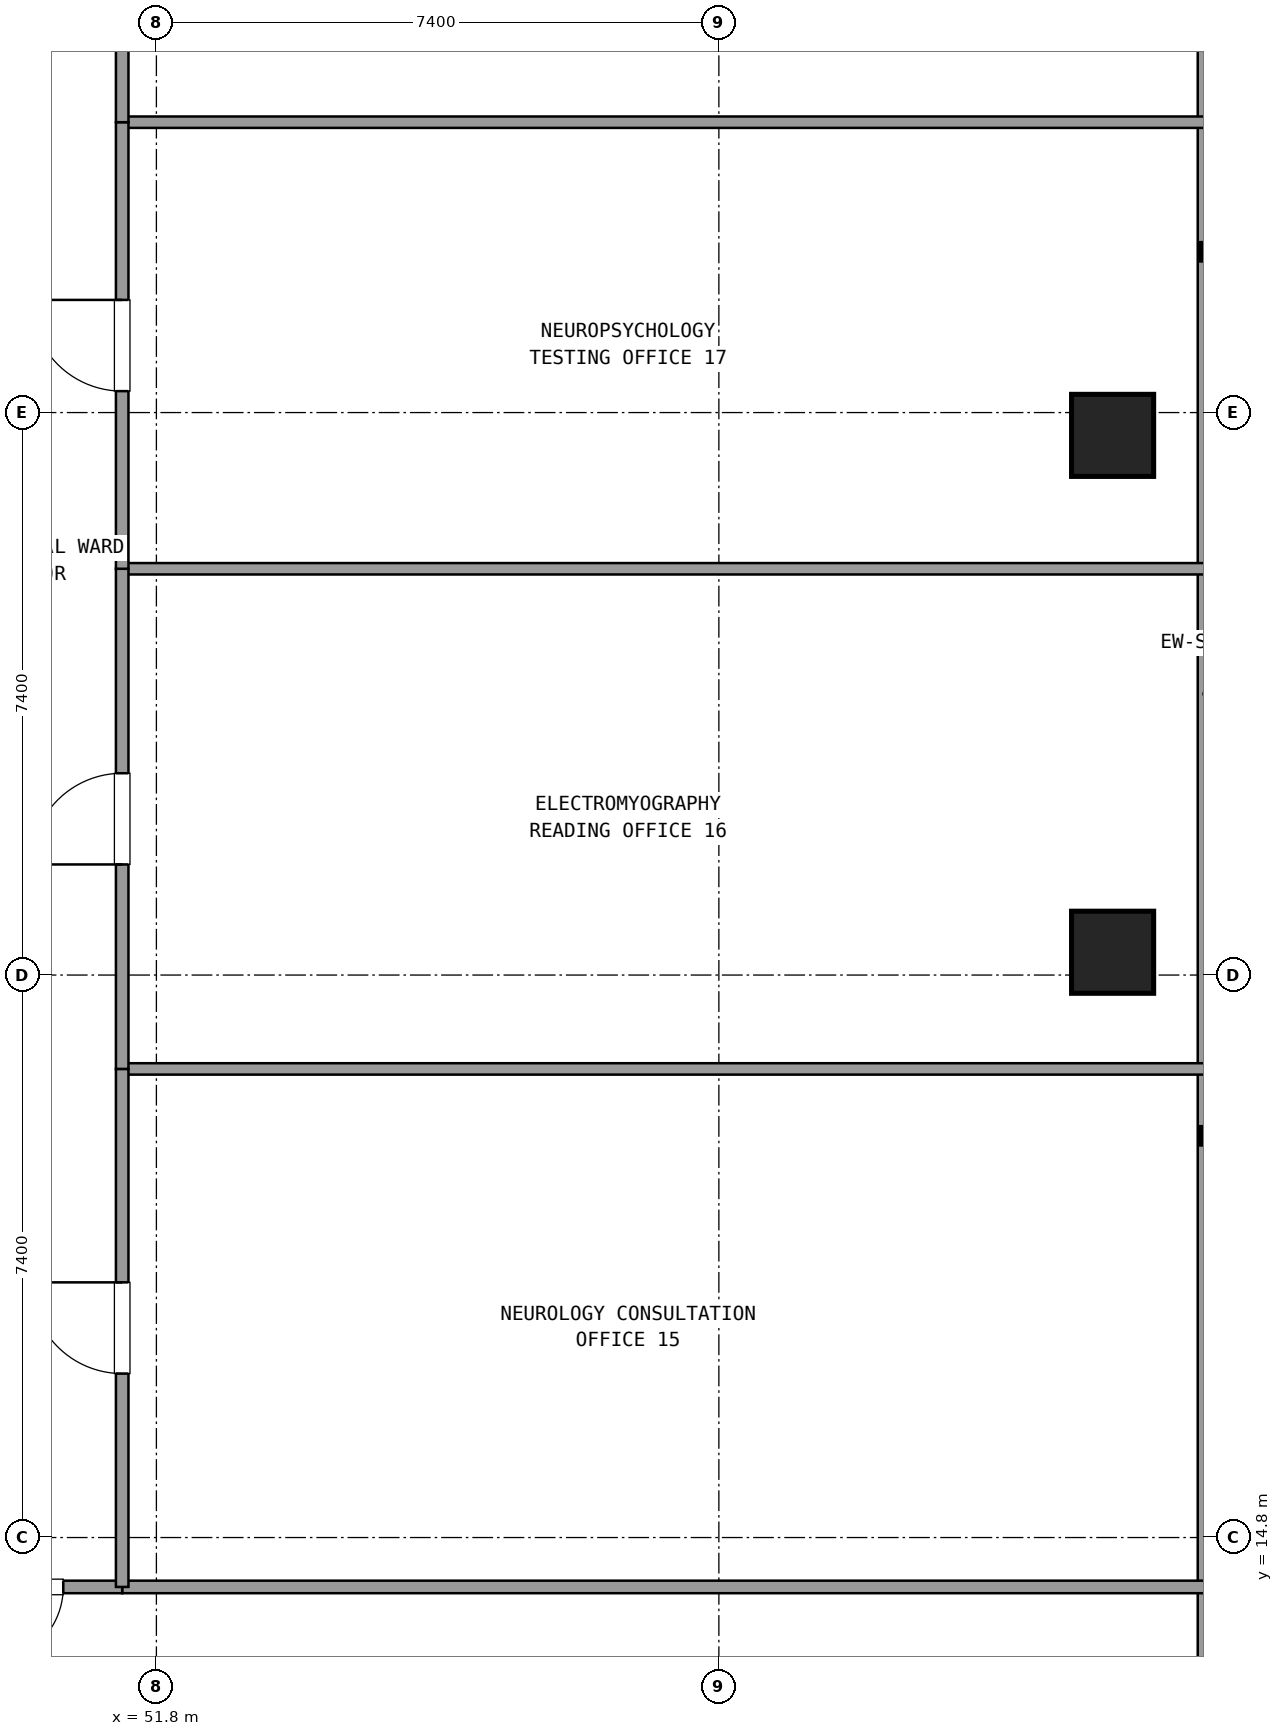
"""IFC4 building model, lengths in metres.
Left out: names, types, materials, properties, quantities, classifications, styles, units other than length and angle.
Written with IfcOpenShell. Run it as: python <this file> out.ifc"""

import sys

from ifc_helpers import new_model, si_unit, direction, frame, frame_2d, origin, origin_2d, place, context, subcontext, project, spatial, rectangle, extrude, element, fill, save


model = new_model("IFC4")
c1 = context("Model", 3, precision=1e-05, world=origin(), true_north=direction((0.0, 1.0)))
c2 = subcontext(c1, "Body", "Model", "MODEL_VIEW")
j1 = project(units=[si_unit("LENGTHUNIT", "METRE"), si_unit("PLANEANGLEUNIT", "RADIAN")], contexts=[c1])
p1 = place(None, origin())
s1 = spatial("IfcSite", under=j1, at=p1, CompositionType="ELEMENT")
p2 = place(p1, origin())
s2 = spatial("IfcBuilding", under=s1, at=p2, CompositionType="ELEMENT")
p3 = place(p2, frame((0.0, 0.0, 67.14)))
s3 = spatial("IfcBuildingStorey", under=s2, at=p3, CompositionType="ELEMENT", Elevation=67.14)
for number, where, z_axis, x_axis in (
    (1, (64.38, 22.5, 0.0), (0.0, 0.0, 1.0), (1.0, 0.0, 0.0)),
    (2, (64.38, 29.3, 0.0), (0.0, 0.0, 1.0), (1.0, 0.0, 0.0)),
):
    element("IfcColumn", number, at=place(p3, frame(where, z_axis=z_axis, x_axis=x_axis)), inside=s3, PredefinedType="COLUMN", context=c2, shape_type="SweptSolid", body=[
        extrude(rectangle(XDim=1.08, YDim=1.08, at=origin_2d()), origin(), (0.0, 0.0, 1.0), 3.6),
    ])
p4 = place(p3, frame((65.62, 8.455, 0.0), z_axis=(0.0, 0.0, 1.0), x_axis=(0.0, 1.0, 0.0)))
e3 = element("IfcWall", 3, at=p4, inside=s3, PredefinedType="SOLIDWALL", context=c2, shape_type="SweptSolid", body=[
    extrude(rectangle(XDim=34.89, YDim=0.24, at=frame_2d((17.445, 0.0))), origin(), (0.0, 0.0, 1.0), 0.85),
])
p5 = place(p3, frame((51.35, 14.15, 0.0), z_axis=(0.0, 0.0, 1.0), x_axis=(1.0, 0.0, 0.0)))
e4 = element("IfcWall", 4, at=p5, inside=s3, PredefinedType="PARTITIONING", context=c2, shape_type="SweptSolid", body=[
    extrude(rectangle(XDim=14.25, YDim=0.165, at=frame_2d((7.125, 0.0))), origin(), (0.0, 0.0, 1.0), 2.59),
])
p6 = place(p3, frame((48.8, 14.15, 0.0), z_axis=(0.0, 0.0, 1.0), x_axis=(1.0, 0.0, 0.0)))
e5 = element("IfcWall", 5, at=p6, inside=s3, PredefinedType="PARTITIONING", context=c2, shape_type="SweptSolid", body=[
    extrude(rectangle(XDim=2.55, YDim=0.165, at=frame_2d((1.275, 0.0))), origin(), (0.0, 0.0, 1.0), 2.59),
])
p7 = place(p6, frame((0.775, 0.0, 0.0)))
e6 = element("IfcOpeningElement", 6, at=p7, cuts=e5, PredefinedType="OPENING", context=c2, shape_type="SweptSolid", body=[
    extrude(rectangle(XDim=1.0, YDim=2.15, at=frame_2d((0.5, 1.075))), frame((0.0, 0.093, 0.0), z_axis=(0.0, -1.0, 0.0), x_axis=(1.0, 0.0, 0.0)), (0.0, 0.0, 1.0), 0.185),
])
p8 = place(p3, frame((51.35, 20.965, 0.0), z_axis=(0.0, 0.0, 1.0), x_axis=(1.0, 0.0, 0.0)))
e7 = element("IfcWall", 7, at=p8, inside=s3, PredefinedType="PARTITIONING", context=c2, shape_type="SweptSolid", body=[
    extrude(rectangle(XDim=14.25, YDim=0.15, at=frame_2d((7.125, 0.0))), origin(), (0.0, 0.0, 1.0), 2.59),
])
p9 = place(p3, frame((51.35, 14.15, 0.0), z_axis=(0.0, 0.0, 1.0), x_axis=(0.0, 1.0, 0.0)))
e8 = element("IfcWall", 8, at=p9, inside=s3, PredefinedType="PARTITIONING", context=c2, shape_type="SweptSolid", body=[
    extrude(rectangle(XDim=6.815, YDim=0.165, at=frame_2d((3.408, 0.0))), origin(), (0.0, 0.0, 1.0), 2.59),
])
p10 = place(p9, frame((2.807, 0.0, 0.0)))
e9 = element("IfcOpeningElement", 9, at=p10, cuts=e8, PredefinedType="OPENING", context=c2, shape_type="SweptSolid", body=[
    extrude(rectangle(XDim=1.2, YDim=2.15, at=frame_2d((0.6, 1.075))), frame((0.0, 0.093, 0.0), z_axis=(0.0, -1.0, 0.0), x_axis=(1.0, 0.0, 0.0)), (0.0, 0.0, 1.0), 0.185),
])
p11 = place(p3, frame((51.35, 27.545, 0.0), z_axis=(0.0, 0.0, 1.0), x_axis=(1.0, 0.0, 0.0)))
e10 = element("IfcWall", 10, at=p11, inside=s3, PredefinedType="PARTITIONING", context=c2, shape_type="SweptSolid", body=[
    extrude(rectangle(XDim=14.25, YDim=0.15, at=frame_2d((7.125, 0.0))), origin(), (0.0, 0.0, 1.0), 2.59),
])
p12 = place(p3, frame((51.35, 20.965, 0.0), z_axis=(0.0, 0.0, 1.0), x_axis=(0.0, 1.0, 0.0)))
e11 = element("IfcWall", 11, at=p12, inside=s3, PredefinedType="PARTITIONING", context=c2, shape_type="SweptSolid", body=[
    extrude(rectangle(XDim=6.58, YDim=0.165, at=frame_2d((3.29, 0.0))), origin(), (0.0, 0.0, 1.0), 2.59),
])
p13 = place(p12, frame((2.69, 0.0, 0.0)))
e12 = element("IfcOpeningElement", 12, at=p13, cuts=e11, PredefinedType="OPENING", context=c2, shape_type="SweptSolid", body=[
    extrude(rectangle(XDim=1.2, YDim=2.15, at=frame_2d((0.6, 1.075))), frame((0.0, 0.093, 0.0), z_axis=(0.0, -1.0, 0.0), x_axis=(1.0, 0.0, 0.0)), (0.0, 0.0, 1.0), 0.185),
])
p14 = place(p3, frame((51.35, 33.42, 0.0), z_axis=(0.0, 0.0, 1.0), x_axis=(1.0, 0.0, 0.0)))
e13 = element("IfcWall", 13, at=p14, inside=s3, PredefinedType="PARTITIONING", context=c2, shape_type="SweptSolid", body=[
    extrude(rectangle(XDim=14.25, YDim=0.15, at=frame_2d((7.125, 0.0))), origin(), (0.0, 0.0, 1.0), 2.59),
])
p15 = place(p3, frame((51.35, 27.545, 0.0), z_axis=(0.0, 0.0, 1.0), x_axis=(0.0, 1.0, 0.0)))
e14 = element("IfcWall", 14, at=p15, inside=s3, PredefinedType="PARTITIONING", context=c2, shape_type="SweptSolid", body=[
    extrude(rectangle(XDim=5.875, YDim=0.165, at=frame_2d((2.938, 0.0))), origin(), (0.0, 0.0, 1.0), 2.59),
])
p16 = place(p15, frame((2.337, 0.0, 0.0)))
e15 = element("IfcOpeningElement", 15, at=p16, cuts=e14, PredefinedType="OPENING", context=c2, shape_type="SweptSolid", body=[
    extrude(rectangle(XDim=1.2, YDim=2.15, at=frame_2d((0.6, 1.075))), frame((0.0, 0.093, 0.0), z_axis=(0.0, -1.0, 0.0), x_axis=(1.0, 0.0, 0.0)), (0.0, 0.0, 1.0), 0.185),
])
p17 = place(p3, frame((51.35, 33.42, 0.0), z_axis=(0.0, 0.0, 1.0), x_axis=(0.0, 1.0, 0.0)))
e16 = element("IfcWall", 16, at=p17, inside=s3, PredefinedType="PARTITIONING", context=c2, shape_type="SweptSolid", body=[
    extrude(rectangle(XDim=4.23, YDim=0.165, at=frame_2d((2.115, 0.0))), origin(), (0.0, 0.0, 1.0), 2.59),
])
p18 = place(p17, frame((1.515, 0.0, 0.0)))
e17 = element("IfcOpeningElement", 17, at=p18, cuts=e16, PredefinedType="OPENING", context=c2, shape_type="SweptSolid", body=[
    extrude(rectangle(XDim=1.2, YDim=2.15, at=frame_2d((0.6, 1.075))), frame((0.0, 0.093, 0.0), z_axis=(0.0, -1.0, 0.0), x_axis=(1.0, 0.0, 0.0)), (0.0, 0.0, 1.0), 0.185),
])
p19 = place(p7, frame((1.0, 0.0, 0.0), z_axis=(0.0, 0.0, 1.0), x_axis=(-1.0, 0.0, 0.0)))
e18 = element("IfcDoor", 18, at=p19, inside=s3, OperationType="SINGLE_SWING_LEFT", PredefinedType="DOOR", context=c2, shape_type="SweptSolid", body=[
    extrude(rectangle(XDim=1.0, YDim=2.15, at=frame_2d((0.5, 1.075))), frame((0.0, 0.025, 0.0), z_axis=(0.0, -1.0, 0.0), x_axis=(1.0, 0.0, 0.0)), (0.0, 0.0, 1.0), 0.05),
])
fill(e6, e18)
p20 = place(p10, origin())
e19 = element("IfcDoor", 19, at=p20, inside=s3, OperationType="SINGLE_SWING_RIGHT", PredefinedType="DOOR", context=c2, shape_type="SweptSolid", body=[
    extrude(rectangle(XDim=1.2, YDim=2.15, at=frame_2d((0.6, 1.075))), frame((0.0, 0.025, 0.0), z_axis=(0.0, -1.0, 0.0), x_axis=(1.0, 0.0, 0.0)), (0.0, 0.0, 1.0), 0.05),
])
fill(e9, e19)
p21 = place(p13, origin())
e20 = element("IfcDoor", 20, at=p21, inside=s3, OperationType="SINGLE_SWING_LEFT", PredefinedType="DOOR", context=c2, shape_type="SweptSolid", body=[
    extrude(rectangle(XDim=1.2, YDim=2.15, at=frame_2d((0.6, 1.075))), frame((0.0, 0.025, 0.0), z_axis=(0.0, -1.0, 0.0), x_axis=(1.0, 0.0, 0.0)), (0.0, 0.0, 1.0), 0.05),
])
fill(e12, e20)
p22 = place(p16, origin())
e21 = element("IfcDoor", 21, at=p22, inside=s3, OperationType="SINGLE_SWING_RIGHT", PredefinedType="DOOR", context=c2, shape_type="SweptSolid", body=[
    extrude(rectangle(XDim=1.2, YDim=2.15, at=frame_2d((0.6, 1.075))), frame((0.0, 0.025, 0.0), z_axis=(0.0, -1.0, 0.0), x_axis=(1.0, 0.0, 0.0)), (0.0, 0.0, 1.0), 0.05),
])
fill(e15, e21)
save(model, sys.argv[1])
